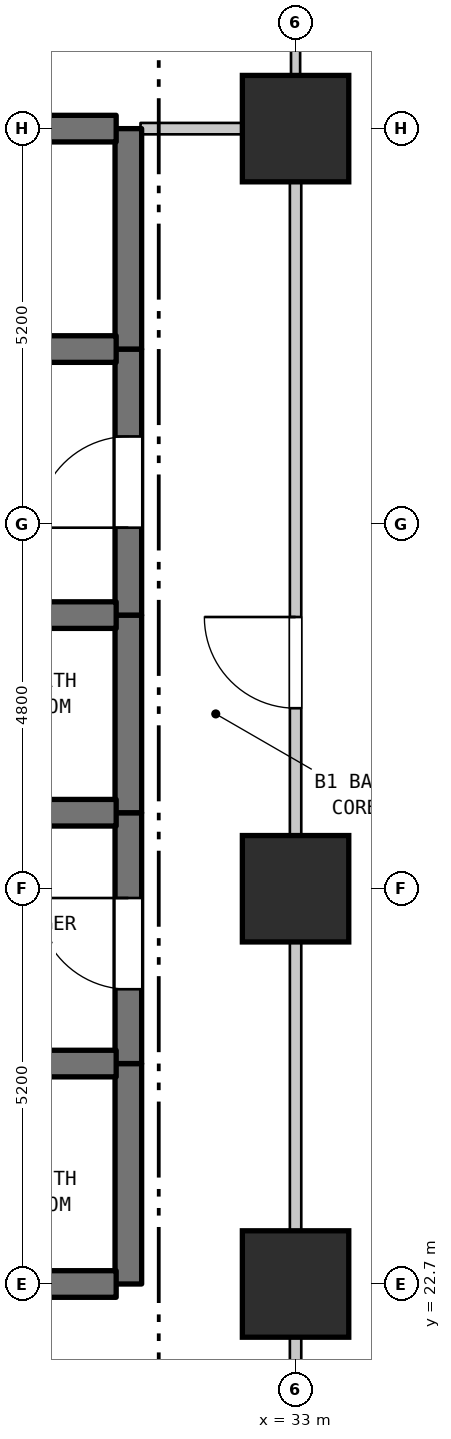
"""IFC4 building model, lengths in metres.
Left out: names, types, materials, properties, quantities, classifications, styles, units other than length and angle.
Written with IfcOpenShell. Run it as: python <this file> out.ifc"""

import sys

from ifc_helpers import new_model, si_unit, direction, frame, frame_2d, origin, origin_2d, place, context, subcontext, project, spatial, rectangle, extrude, element, fill, save


model = new_model("IFC4")
c1 = context("Model", 3, precision=1e-05, world=origin(), true_north=direction((0.0, 1.0)))
c2 = subcontext(c1, "Body", "Model", "MODEL_VIEW")
j1 = project(units=[si_unit("LENGTHUNIT", "METRE"), si_unit("PLANEANGLEUNIT", "RADIAN")], contexts=[c1])
p1 = place(None, origin())
s1 = spatial("IfcSite", under=j1, at=p1, CompositionType="ELEMENT")
p2 = place(p1, origin())
s2 = spatial("IfcBuilding", under=s1, at=p2, CompositionType="ELEMENT")
p3 = place(p2, frame((0.0, 0.0, -4.5)))
s3 = spatial("IfcBuildingStorey", under=s2, at=p3, CompositionType="ELEMENT", Elevation=-4.5)
for number, where, z_axis, x_axis in (
    (1, (33.0, 22.7, 0.0), (0.0, 0.0, 1.0), (1.0, 0.0, 0.0)),
    (2, (33.0, 27.9, 0.0), (0.0, 0.0, 1.0), (1.0, 0.0, 0.0)),
    (3, (33.0, 37.9, 0.0), (0.0, 0.0, 1.0), (1.0, 0.0, 0.0)),
):
    element("IfcColumn", number, at=place(p3, frame(where, z_axis=z_axis, x_axis=x_axis)), inside=s3, PredefinedType="PILASTER", context=c2, shape_type="SweptSolid", body=[
        extrude(rectangle(XDim=1.4, YDim=1.4, at=origin_2d()), origin(), (0.0, 0.0, 1.0), 4.5),
    ])
p4 = place(p3, frame((30.8, 22.7, 0.0), z_axis=(0.0, 0.0, 1.0), x_axis=(0.0, 1.0, 0.0)))
e4 = element("IfcWall", 4, at=p4, inside=s3, PredefinedType="SHEAR", context=c2, shape_type="SweptSolid", body=[
    extrude(rectangle(XDim=2.9, YDim=0.35, at=frame_2d((1.45, 0.0))), origin(), (0.0, 0.0, 1.0), 4.1),
])
p5 = place(p3, frame((30.8, 25.6, 0.0), z_axis=(0.0, 0.0, 1.0), x_axis=(0.0, 1.0, 0.0)))
e5 = element("IfcWall", 5, at=p5, inside=s3, PredefinedType="SHEAR", context=c2, shape_type="SweptSolid", body=[
    extrude(rectangle(XDim=3.3, YDim=0.35, at=frame_2d((1.65, 0.0))), origin(), (0.0, 0.0, 1.0), 4.1),
])
p6 = place(p5, frame((0.978, 0.0, 0.0)))
e6 = element("IfcOpeningElement", 6, at=p6, cuts=e5, PredefinedType="OPENING", context=c2, shape_type="SweptSolid", body=[
    extrude(rectangle(XDim=1.2, YDim=2.2, at=frame_2d((0.6, 1.1))), frame((0.0, 0.185, 0.0), z_axis=(0.0, -1.0, 0.0), x_axis=(1.0, 0.0, 0.0)), (0.0, 0.0, 1.0), 0.37),
])
p7 = place(p3, frame((30.8, 28.9, 0.0), z_axis=(0.0, 0.0, 1.0), x_axis=(0.0, 1.0, 0.0)))
e7 = element("IfcWall", 7, at=p7, inside=s3, PredefinedType="SHEAR", context=c2, shape_type="SweptSolid", body=[
    extrude(rectangle(XDim=2.6, YDim=0.35, at=frame_2d((1.3, 0.0))), origin(), (0.0, 0.0, 1.0), 4.1),
])
p8 = place(p3, frame((30.8, 31.5, 0.0), z_axis=(0.0, 0.0, 1.0), x_axis=(0.0, 1.0, 0.0)))
e8 = element("IfcWall", 8, at=p8, inside=s3, PredefinedType="SHEAR", context=c2, shape_type="SweptSolid", body=[
    extrude(rectangle(XDim=3.5, YDim=0.35, at=frame_2d((1.75, 0.0))), origin(), (0.0, 0.0, 1.0), 4.1),
])
p9 = place(p8, frame((1.15, 0.0, 0.0)))
e9 = element("IfcOpeningElement", 9, at=p9, cuts=e8, PredefinedType="OPENING", context=c2, shape_type="SweptSolid", body=[
    extrude(rectangle(XDim=1.2, YDim=2.2, at=frame_2d((0.6, 1.1))), frame((0.0, 0.185, 0.0), z_axis=(0.0, -1.0, 0.0), x_axis=(1.0, 0.0, 0.0)), (0.0, 0.0, 1.0), 0.37),
])
p10 = place(p3, frame((30.8, 35.0, 0.0), z_axis=(0.0, 0.0, 1.0), x_axis=(0.0, 1.0, 0.0)))
e10 = element("IfcWall", 10, at=p10, inside=s3, PredefinedType="SHEAR", context=c2, shape_type="SweptSolid", body=[
    extrude(rectangle(XDim=2.9, YDim=0.35, at=frame_2d((1.45, 0.0))), origin(), (0.0, 0.0, 1.0), 4.1),
])
p11 = place(p3, frame((33.0, 20.3, 0.0), z_axis=(0.0, 0.0, 1.0), x_axis=(0.0, 1.0, 0.0)))
e11 = element("IfcWall", 11, at=p11, inside=s3, PredefinedType="STANDARD", context=c2, shape_type="SweptSolid", body=[
    extrude(rectangle(XDim=2.4, YDim=0.15, at=frame_2d((1.2, 0.0))), origin(), (0.0, 0.0, 1.0), 3.55),
])
p12 = place(p3, frame((33.0, 37.9, 0.0), z_axis=(0.0, 0.0, 1.0), x_axis=(0.0, 1.0, 0.0)))
e12 = element("IfcWall", 12, at=p12, inside=s3, PredefinedType="PARTITIONING", context=c2, shape_type="SweptSolid", body=[
    extrude(rectangle(XDim=16.19, YDim=0.12, at=frame_2d((8.095, 0.0))), origin(), (0.0, 0.0, 1.0), 3.5),
])
p13 = place(p3, frame((27.46, 22.7, 0.0), z_axis=(0.0, 0.0, 1.0), x_axis=(1.0, 0.0, 0.0)))
e13 = element("IfcWall", 13, at=p13, inside=s3, PredefinedType="SHEAR", context=c2, shape_type="SweptSolid", body=[
    extrude(rectangle(XDim=3.18, YDim=0.35, at=frame_2d((1.59, 0.0))), origin(), (0.0, 0.0, 1.0), 4.1),
])
p14 = place(p3, frame((27.46, 25.6, 0.0), z_axis=(0.0, 0.0, 1.0), x_axis=(1.0, 0.0, 0.0)))
e14 = element("IfcWall", 14, at=p14, inside=s3, PredefinedType="SHEAR", context=c2, shape_type="SweptSolid", body=[
    extrude(rectangle(XDim=3.18, YDim=0.35, at=frame_2d((1.59, 0.0))), origin(), (0.0, 0.0, 1.0), 4.1),
])
p15 = place(p14, frame((1.14, 0.0, 0.0)))
e15 = element("IfcOpeningElement", 15, at=p15, cuts=e14, PredefinedType="OPENING", context=c2, shape_type="SweptSolid", body=[
    extrude(rectangle(XDim=0.9, YDim=2.15, at=frame_2d((0.45, 1.075))), frame((0.0, 0.185, 0.0), z_axis=(0.0, -1.0, 0.0), x_axis=(1.0, 0.0, 0.0)), (0.0, 0.0, 1.0), 0.37),
])
p16 = place(p3, frame((27.46, 28.9, 0.0), z_axis=(0.0, 0.0, 1.0), x_axis=(1.0, 0.0, 0.0)))
e16 = element("IfcWall", 16, at=p16, inside=s3, PredefinedType="SHEAR", context=c2, shape_type="SweptSolid", body=[
    extrude(rectangle(XDim=3.18, YDim=0.35, at=frame_2d((1.59, 0.0))), origin(), (0.0, 0.0, 1.0), 4.1),
])
p17 = place(p16, frame((1.14, 0.0, 0.0)))
e17 = element("IfcOpeningElement", 17, at=p17, cuts=e16, PredefinedType="OPENING", context=c2, shape_type="SweptSolid", body=[
    extrude(rectangle(XDim=0.9, YDim=2.15, at=frame_2d((0.45, 1.075))), frame((0.0, 0.185, 0.0), z_axis=(0.0, -1.0, 0.0), x_axis=(1.0, 0.0, 0.0)), (0.0, 0.0, 1.0), 0.37),
])
p18 = place(p3, frame((23.96, 31.5, 0.0), z_axis=(0.0, 0.0, 1.0), x_axis=(1.0, 0.0, 0.0)))
e18 = element("IfcWall", 18, at=p18, inside=s3, PredefinedType="SHEAR", context=c2, shape_type="SweptSolid", body=[
    extrude(rectangle(XDim=6.68, YDim=0.35, at=frame_2d((3.34, 0.0))), origin(), (0.0, 0.0, 1.0), 4.1),
])
p19 = place(p18, frame((1.24, 0.0, 0.0)))
e19 = element("IfcOpeningElement", 19, at=p19, cuts=e18, PredefinedType="OPENING", context=c2, shape_type="SweptSolid", body=[
    extrude(rectangle(XDim=0.85, YDim=2.1, at=frame_2d((0.425, 1.05))), frame((0.0, 0.185, 0.0), z_axis=(0.0, -1.0, 0.0), x_axis=(1.0, 0.0, 0.0)), (0.0, 0.0, 1.0), 0.37),
])
p20 = place(p3, frame((23.96, 35.0, 0.0), z_axis=(0.0, 0.0, 1.0), x_axis=(1.0, 0.0, 0.0)))
e20 = element("IfcWall", 20, at=p20, inside=s3, PredefinedType="SHEAR", context=c2, shape_type="SweptSolid", body=[
    extrude(rectangle(XDim=6.68, YDim=0.35, at=frame_2d((3.34, 0.0))), origin(), (0.0, 0.0, 1.0), 4.1),
])
p21 = place(p20, frame((2.794, 0.0, 0.0)))
e21 = element("IfcOpeningElement", 21, at=p21, cuts=e20, PredefinedType="OPENING", context=c2, shape_type="SweptSolid", body=[
    extrude(rectangle(XDim=0.95, YDim=2.15, at=frame_2d((0.475, 1.075))), frame((0.0, 0.185, 0.0), z_axis=(0.0, -1.0, 0.0), x_axis=(1.0, 0.0, 0.0)), (0.0, 0.0, 1.0), 0.37),
])
p22 = place(p3, frame((23.96, 37.9, 0.0), z_axis=(0.0, 0.0, 1.0), x_axis=(1.0, 0.0, 0.0)))
e22 = element("IfcWall", 22, at=p22, inside=s3, PredefinedType="SHEAR", context=c2, shape_type="SweptSolid", body=[
    extrude(rectangle(XDim=6.68, YDim=0.35, at=frame_2d((3.34, 0.0))), origin(), (0.0, 0.0, 1.0), 4.1),
])
p23 = place(p3, frame((30.96, 37.9, 0.0), z_axis=(0.0, 0.0, 1.0), x_axis=(1.0, 0.0, 0.0)))
e23 = element("IfcWall", 23, at=p23, inside=s3, PredefinedType="STANDARD", context=c2, shape_type="SweptSolid", body=[
    extrude(rectangle(XDim=1.98, YDim=0.15, at=frame_2d((0.99, 0.0))), origin(), (0.0, 0.0, 1.0), 3.2),
])
p24 = place(p3, frame((33.0, 22.7, 0.0), z_axis=(0.0, 0.0, 1.0), x_axis=(0.0, 1.0, 0.0)))
e24 = element("IfcWall", 24, at=p24, inside=s3, PredefinedType="STANDARD", context=c2, shape_type="SweptSolid", body=[
    extrude(rectangle(XDim=15.2, YDim=0.15, at=frame_2d((7.6, 0.0))), origin(), (0.0, 0.0, 1.0), 3.5),
])
p25 = place(p24, frame((7.575, 0.0, 0.0)))
e25 = element("IfcOpeningElement", 25, at=p25, cuts=e24, PredefinedType="OPENING", context=c2, shape_type="SweptSolid", body=[
    extrude(rectangle(XDim=1.2, YDim=2.2, at=frame_2d((0.6, 1.1))), frame((0.0, 0.085, 0.0), z_axis=(0.0, -1.0, 0.0), x_axis=(1.0, 0.0, 0.0)), (0.0, 0.0, 1.0), 0.17),
])
p26 = place(p6, origin())
e26 = element("IfcDoor", 26, at=p26, inside=s3, OperationType="SINGLE_SWING_RIGHT", PredefinedType="DOOR", context=c2, shape_type="SweptSolid", body=[
    extrude(rectangle(XDim=1.2, YDim=2.2, at=frame_2d((0.6, 1.1))), frame((0.0, 0.025, 0.0), z_axis=(0.0, -1.0, 0.0), x_axis=(1.0, 0.0, 0.0)), (0.0, 0.0, 1.0), 0.05),
])
fill(e6, e26)
p27 = place(p9, origin())
e27 = element("IfcDoor", 27, at=p27, inside=s3, OperationType="SINGLE_SWING_LEFT", PredefinedType="DOOR", context=c2, shape_type="SweptSolid", body=[
    extrude(rectangle(XDim=1.2, YDim=2.2, at=frame_2d((0.6, 1.1))), frame((0.0, 0.025, 0.0), z_axis=(0.0, -1.0, 0.0), x_axis=(1.0, 0.0, 0.0)), (0.0, 0.0, 1.0), 0.05),
])
fill(e9, e27)
p28 = place(p25, origin())
e28 = element("IfcDoor", 28, at=p28, inside=s3, OperationType="SINGLE_SWING_RIGHT", PredefinedType="DOOR", context=c2, shape_type="SweptSolid", body=[
    extrude(rectangle(XDim=1.2, YDim=2.2, at=frame_2d((0.6, 1.1))), frame((0.0, 0.025, 0.0), z_axis=(0.0, -1.0, 0.0), x_axis=(1.0, 0.0, 0.0)), (0.0, 0.0, 1.0), 0.05),
])
fill(e25, e28)
save(model, sys.argv[1])
